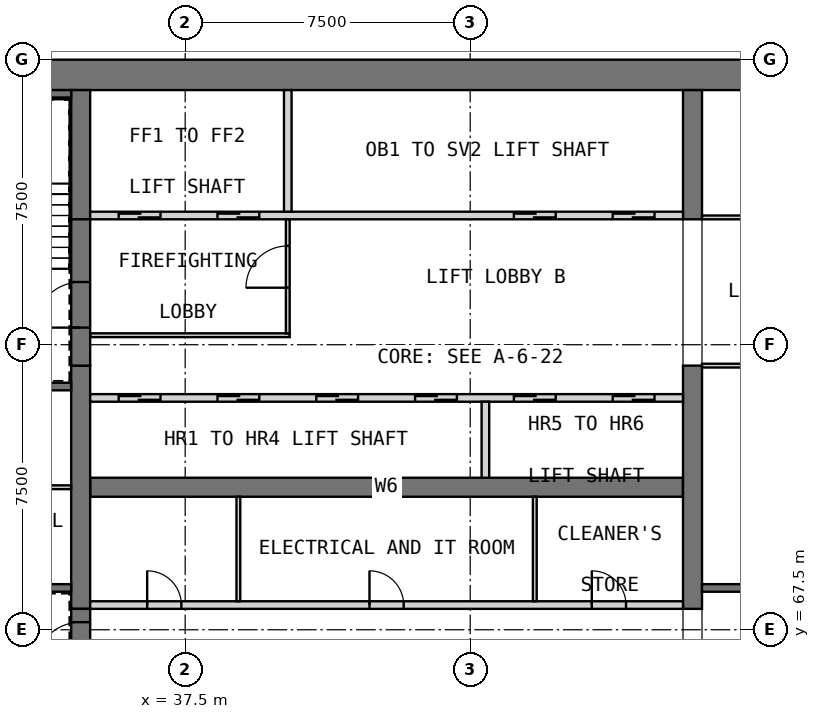
"""IFC4 building model, lengths in metres.
Left out: names, types, materials, properties, quantities, classifications, styles, units other than length and angle.
Written with IfcOpenShell. Run it as: python <this file> out.ifc"""

import sys

from ifc_helpers import new_model, si_unit, direction, frame, frame_2d, origin, place, context, subcontext, project, spatial, rectangle, extrude, element, fill, save


model = new_model("IFC4")
c1 = context("Model", 3, precision=1e-05, world=origin(), true_north=direction((0.0, 1.0)))
c2 = subcontext(c1, "Body", "Model", "MODEL_VIEW")
j1 = project(units=[si_unit("LENGTHUNIT", "METRE"), si_unit("PLANEANGLEUNIT", "RADIAN")], contexts=[c1])
p1 = place(None, origin())
s1 = spatial("IfcSite", under=j1, at=p1, CompositionType="ELEMENT")
p2 = place(p1, origin())
s2 = spatial("IfcBuilding", under=s1, at=p2, CompositionType="ELEMENT")
p3 = place(p2, frame((0.0, 0.0, 174.2)))
s3 = spatial("IfcBuildingStorey", under=s2, at=p3, CompositionType="ELEMENT", Elevation=174.2)
p4 = place(p3, frame((30.0, 82.1, 0.0), z_axis=(0.0, 0.0, 1.0), x_axis=(1.0, 0.0, 0.0)))
e1 = element("IfcWall", 1, at=p4, inside=s3, PredefinedType="SHEAR", context=c2, shape_type="SweptSolid", body=[
    extrude(rectangle(XDim=30.0, YDim=0.8, at=frame_2d((15.0, 0.0))), origin(), (0.0, 0.0, 1.0), 5.0),
])
p5 = place(p3, frame((35.0, 71.25, 0.0), z_axis=(0.0, 0.0, 1.0), x_axis=(1.0, 0.0, 0.0)))
e2 = element("IfcWall", 2, at=p5, inside=s3, PredefinedType="SHEAR", context=c2, shape_type="SweptSolid", body=[
    extrude(rectangle(XDim=15.6, YDim=0.5, at=frame_2d((7.8, 0.0))), origin(), (0.0, 0.0, 1.0), 5.0),
])
p6 = place(p3, frame((34.75, 68.05, 0.0), z_axis=(0.0, 0.0, 1.0), x_axis=(0.0, 1.0, 0.0)))
e3 = element("IfcWall", 3, at=p6, inside=s3, PredefinedType="SHEAR", context=c2, shape_type="SweptSolid", body=[
    extrude(rectangle(XDim=6.4, YDim=0.5, at=frame_2d((3.2, 0.0))), origin(), (0.0, 0.0, 1.0), 5.0),
])
p7 = place(p3, frame((34.75, 78.3, 0.0), z_axis=(0.0, 0.0, 1.0), x_axis=(0.0, 1.0, 0.0)))
e4 = element("IfcWall", 4, at=p7, inside=s3, PredefinedType="SHEAR", context=c2, shape_type="SweptSolid", body=[
    extrude(rectangle(XDim=3.4, YDim=0.5, at=frame_2d((1.7, 0.0))), origin(), (0.0, 0.0, 1.0), 5.0),
])
p8 = place(p3, frame((50.85, 68.05, 0.0), z_axis=(0.0, 0.0, 1.0), x_axis=(0.0, 1.0, 0.0)))
e5 = element("IfcWall", 5, at=p8, inside=s3, PredefinedType="SHEAR", context=c2, shape_type="SweptSolid", body=[
    extrude(rectangle(XDim=6.4, YDim=0.5, at=frame_2d((3.2, 0.0))), origin(), (0.0, 0.0, 1.0), 5.0),
])
p9 = place(p3, frame((50.85, 78.3, 0.0), z_axis=(0.0, 0.0, 1.0), x_axis=(0.0, 1.0, 0.0)))
e6 = element("IfcWall", 6, at=p9, inside=s3, PredefinedType="SHEAR", context=c2, shape_type="SweptSolid", body=[
    extrude(rectangle(XDim=3.4, YDim=0.5, at=frame_2d((1.7, 0.0))), origin(), (0.0, 0.0, 1.0), 5.0),
])
p10 = place(p3, frame((35.0, 68.15, 0.0), z_axis=(0.0, 0.0, 1.0), x_axis=(1.0, 0.0, 0.0)))
e7 = element("IfcWall", 7, at=p10, inside=s3, PredefinedType="PARTITIONING", context=c2, shape_type="SweptSolid", body=[
    extrude(rectangle(XDim=15.6, YDim=0.2, at=frame_2d((7.8, 0.0))), origin(), (0.0, 0.0, 1.0), 4.75),
])
p11 = place(p10, frame((1.5, 0.0, 0.0)))
e8 = element("IfcOpeningElement", 8, at=p11, cuts=e7, PredefinedType="OPENING", context=c2, shape_type="SweptSolid", body=[
    extrude(rectangle(XDim=0.9, YDim=2.1, at=frame_2d((0.45, 1.05))), frame((0.0, 0.11, 0.0), z_axis=(0.0, -1.0, 0.0), x_axis=(1.0, 0.0, 0.0)), (0.0, 0.0, 1.0), 0.22),
])
p12 = place(p10, frame((7.35, 0.0, 0.0)))
e9 = element("IfcOpeningElement", 9, at=p12, cuts=e7, PredefinedType="OPENING", context=c2, shape_type="SweptSolid", body=[
    extrude(rectangle(XDim=0.9, YDim=2.1, at=frame_2d((0.45, 1.05))), frame((0.0, 0.11, 0.0), z_axis=(0.0, -1.0, 0.0), x_axis=(1.0, 0.0, 0.0)), (0.0, 0.0, 1.0), 0.22),
])
p13 = place(p10, frame((13.2, 0.0, 0.0)))
e10 = element("IfcOpeningElement", 10, at=p13, cuts=e7, PredefinedType="OPENING", context=c2, shape_type="SweptSolid", body=[
    extrude(rectangle(XDim=0.9, YDim=2.1, at=frame_2d((0.45, 1.05))), frame((0.0, 0.11, 0.0), z_axis=(0.0, -1.0, 0.0), x_axis=(1.0, 0.0, 0.0)), (0.0, 0.0, 1.0), 0.22),
])
for number, where, z_axis, x_axis in (
    (11, (38.9, 68.25, 0.0), (0.0, 0.0, 1.0), (0.0, 1.0, 0.0)),
    (12, (46.7, 68.25, 0.0), (0.0, 0.0, 1.0), (0.0, 1.0, 0.0)),
):
    element("IfcWall", number, at=place(p3, frame(where, z_axis=z_axis, x_axis=x_axis)), inside=s3, PredefinedType="PARTITIONING", context=c2, shape_type="SweptSolid", body=[
        extrude(rectangle(XDim=2.75, YDim=0.1, at=frame_2d((1.375, 0.0))), origin(), (0.0, 0.0, 1.0), 4.75),
    ])
p14 = place(p3, frame((35.0, 73.6, 0.0), z_axis=(0.0, 0.0, 1.0), x_axis=(1.0, 0.0, 0.0)))
e13 = element("IfcWall", 13, at=p14, inside=s3, PredefinedType="SOLIDWALL", context=c2, shape_type="SweptSolid", body=[
    extrude(rectangle(XDim=15.6, YDim=0.2, at=frame_2d((7.8, 0.0))), origin(), (0.0, 0.0, 1.0), 5.0),
])
p15 = place(p14, frame((0.75, 0.0, 0.0)))
e14 = element("IfcOpeningElement", 14, at=p15, cuts=e13, PredefinedType="OPENING", context=c2, shape_type="SweptSolid", body=[
    extrude(rectangle(XDim=1.1, YDim=2.1, at=frame_2d((0.55, 1.05))), frame((0.0, 0.11, 0.0), z_axis=(0.0, -1.0, 0.0), x_axis=(1.0, 0.0, 0.0)), (0.0, 0.0, 1.0), 0.22),
])
p16 = place(p14, frame((3.35, 0.0, 0.0)))
e15 = element("IfcOpeningElement", 15, at=p16, cuts=e13, PredefinedType="OPENING", context=c2, shape_type="SweptSolid", body=[
    extrude(rectangle(XDim=1.1, YDim=2.1, at=frame_2d((0.55, 1.05))), frame((0.0, 0.11, 0.0), z_axis=(0.0, -1.0, 0.0), x_axis=(1.0, 0.0, 0.0)), (0.0, 0.0, 1.0), 0.22),
])
p17 = place(p14, frame((5.95, 0.0, 0.0)))
e16 = element("IfcOpeningElement", 16, at=p17, cuts=e13, PredefinedType="OPENING", context=c2, shape_type="SweptSolid", body=[
    extrude(rectangle(XDim=1.1, YDim=2.1, at=frame_2d((0.55, 1.05))), frame((0.0, 0.11, 0.0), z_axis=(0.0, -1.0, 0.0), x_axis=(1.0, 0.0, 0.0)), (0.0, 0.0, 1.0), 0.22),
])
p18 = place(p14, frame((8.55, 0.0, 0.0)))
e17 = element("IfcOpeningElement", 17, at=p18, cuts=e13, PredefinedType="OPENING", context=c2, shape_type="SweptSolid", body=[
    extrude(rectangle(XDim=1.1, YDim=2.1, at=frame_2d((0.55, 1.05))), frame((0.0, 0.11, 0.0), z_axis=(0.0, -1.0, 0.0), x_axis=(1.0, 0.0, 0.0)), (0.0, 0.0, 1.0), 0.22),
])
p19 = place(p14, frame((11.15, 0.0, 0.0)))
e18 = element("IfcOpeningElement", 18, at=p19, cuts=e13, PredefinedType="OPENING", context=c2, shape_type="SweptSolid", body=[
    extrude(rectangle(XDim=1.1, YDim=2.1, at=frame_2d((0.55, 1.05))), frame((0.0, 0.11, 0.0), z_axis=(0.0, -1.0, 0.0), x_axis=(1.0, 0.0, 0.0)), (0.0, 0.0, 1.0), 0.22),
])
p20 = place(p14, frame((13.75, 0.0, 0.0)))
e19 = element("IfcOpeningElement", 19, at=p20, cuts=e13, PredefinedType="OPENING", context=c2, shape_type="SweptSolid", body=[
    extrude(rectangle(XDim=1.1, YDim=2.1, at=frame_2d((0.55, 1.05))), frame((0.0, 0.11, 0.0), z_axis=(0.0, -1.0, 0.0), x_axis=(1.0, 0.0, 0.0)), (0.0, 0.0, 1.0), 0.22),
])
p21 = place(p3, frame((45.4, 71.5, 0.0), z_axis=(0.0, 0.0, 1.0), x_axis=(0.0, 1.0, 0.0)))
e20 = element("IfcWall", 20, at=p21, inside=s3, PredefinedType="SOLIDWALL", context=c2, shape_type="SweptSolid", body=[
    extrude(rectangle(XDim=2.0, YDim=0.2, at=frame_2d((1.0, 0.0))), origin(), (0.0, 0.0, 1.0), 5.0),
])
p22 = place(p3, frame((35.0, 78.4, 0.0), z_axis=(0.0, 0.0, 1.0), x_axis=(1.0, 0.0, 0.0)))
e21 = element("IfcWall", 21, at=p22, inside=s3, PredefinedType="SOLIDWALL", context=c2, shape_type="SweptSolid", body=[
    extrude(rectangle(XDim=15.6, YDim=0.2, at=frame_2d((7.8, 0.0))), origin(), (0.0, 0.0, 1.0), 5.0),
])
p23 = place(p22, frame((0.75, 0.0, 0.0)))
e22 = element("IfcOpeningElement", 22, at=p23, cuts=e21, PredefinedType="OPENING", context=c2, shape_type="SweptSolid", body=[
    extrude(rectangle(XDim=1.1, YDim=2.1, at=frame_2d((0.55, 1.05))), frame((0.0, 0.11, 0.0), z_axis=(0.0, -1.0, 0.0), x_axis=(1.0, 0.0, 0.0)), (0.0, 0.0, 1.0), 0.22),
])
p24 = place(p22, frame((3.35, 0.0, 0.0)))
e23 = element("IfcOpeningElement", 23, at=p24, cuts=e21, PredefinedType="OPENING", context=c2, shape_type="SweptSolid", body=[
    extrude(rectangle(XDim=1.1, YDim=2.1, at=frame_2d((0.55, 1.05))), frame((0.0, 0.11, 0.0), z_axis=(0.0, -1.0, 0.0), x_axis=(1.0, 0.0, 0.0)), (0.0, 0.0, 1.0), 0.22),
])
p25 = place(p22, frame((11.15, 0.0, 0.0)))
e24 = element("IfcOpeningElement", 24, at=p25, cuts=e21, PredefinedType="OPENING", context=c2, shape_type="SweptSolid", body=[
    extrude(rectangle(XDim=1.1, YDim=2.1, at=frame_2d((0.55, 1.05))), frame((0.0, 0.11, 0.0), z_axis=(0.0, -1.0, 0.0), x_axis=(1.0, 0.0, 0.0)), (0.0, 0.0, 1.0), 0.22),
])
p26 = place(p22, frame((13.75, 0.0, 0.0)))
e25 = element("IfcOpeningElement", 25, at=p26, cuts=e21, PredefinedType="OPENING", context=c2, shape_type="SweptSolid", body=[
    extrude(rectangle(XDim=1.1, YDim=2.1, at=frame_2d((0.55, 1.05))), frame((0.0, 0.11, 0.0), z_axis=(0.0, -1.0, 0.0), x_axis=(1.0, 0.0, 0.0)), (0.0, 0.0, 1.0), 0.22),
])
p27 = place(p3, frame((40.2, 78.5, 0.0), z_axis=(0.0, 0.0, 1.0), x_axis=(0.0, 1.0, 0.0)))
e26 = element("IfcWall", 26, at=p27, inside=s3, PredefinedType="SOLIDWALL", context=c2, shape_type="SweptSolid", body=[
    extrude(rectangle(XDim=3.2, YDim=0.2, at=frame_2d((1.6, 0.0))), origin(), (0.0, 0.0, 1.0), 5.0),
])
p28 = place(p3, frame((35.0, 75.25, 0.0), z_axis=(0.0, 0.0, 1.0), x_axis=(1.0, 0.0, 0.0)))
e27 = element("IfcWall", 27, at=p28, inside=s3, PredefinedType="PARTITIONING", context=c2, shape_type="SweptSolid", body=[
    extrude(rectangle(XDim=5.25, YDim=0.1, at=frame_2d((2.625, 0.0))), origin(), (0.0, 0.0, 1.0), 4.75),
])
p29 = place(p3, frame((40.2, 75.3, 0.0), z_axis=(0.0, 0.0, 1.0), x_axis=(0.0, 1.0, 0.0)))
e28 = element("IfcWall", 28, at=p29, inside=s3, PredefinedType="PARTITIONING", context=c2, shape_type="SweptSolid", body=[
    extrude(rectangle(XDim=3.0, YDim=0.1, at=frame_2d((1.5, 0.0))), origin(), (0.0, 0.0, 1.0), 4.75),
])
p30 = place(p29, frame((1.2, 0.0, 0.0)))
e29 = element("IfcOpeningElement", 29, at=p30, cuts=e28, PredefinedType="OPENING", context=c2, shape_type="SweptSolid", body=[
    extrude(rectangle(XDim=1.1, YDim=2.1, at=frame_2d((0.55, 1.05))), frame((0.0, 0.06, 0.0), z_axis=(0.0, -1.0, 0.0), x_axis=(1.0, 0.0, 0.0)), (0.0, 0.0, 1.0), 0.12),
])
p31 = place(p3, frame((34.75, 64.2, 0.0), z_axis=(0.0, 0.0, 1.0), x_axis=(0.0, 1.0, 0.0)))
e30 = element("IfcWall", 30, at=p31, inside=s3, PredefinedType="SOLIDWALL", context=c2, shape_type="SweptSolid", body=[
    extrude(rectangle(XDim=3.85, YDim=0.5, at=frame_2d((1.925, 0.0))), origin(), (0.0, 0.0, 1.0), 3.8),
])
p32 = place(p31, frame((2.3, 0.0, 0.0)))
e31 = element("IfcOpeningElement", 31, at=p32, cuts=e30, PredefinedType="OPENING", context=c2, shape_type="SweptSolid", body=[
    extrude(rectangle(XDim=1.2, YDim=2.1, at=frame_2d((0.6, 1.05))), frame((0.0, 0.26, 0.0), z_axis=(0.0, -1.0, 0.0), x_axis=(1.0, 0.0, 0.0)), (0.0, 0.0, 1.0), 0.52),
])
p33 = place(p3, frame((34.75, 74.45, 0.0), z_axis=(0.0, 0.0, 1.0), x_axis=(0.0, 1.0, 0.0)))
e32 = element("IfcWall", 32, at=p33, inside=s3, PredefinedType="SOLIDWALL", context=c2, shape_type="SweptSolid", body=[
    extrude(rectangle(XDim=3.85, YDim=0.5, at=frame_2d((1.925, 0.0))), origin(), (0.0, 0.0, 1.0), 3.8),
])
p34 = place(p33, frame((1.0, 0.0, 0.0)))
e33 = element("IfcOpeningElement", 33, at=p34, cuts=e32, PredefinedType="OPENING", context=c2, shape_type="SweptSolid", body=[
    extrude(rectangle(XDim=1.2, YDim=2.1, at=frame_2d((0.6, 1.05))), frame((0.0, 0.26, 0.0), z_axis=(0.0, -1.0, 0.0), x_axis=(1.0, 0.0, 0.0)), (0.0, 0.0, 1.0), 0.52),
])
p35 = place(p3, frame((30.8, 68.6, 0.0), z_axis=(0.0, 0.0, 1.0), x_axis=(1.0, 0.0, 0.0)))
e34 = element("IfcWall", 34, at=p35, inside=s3, PredefinedType="SOLIDWALL", context=c2, shape_type="SweptSolid", body=[
    extrude(rectangle(XDim=3.7, YDim=0.2, at=frame_2d((1.85, 0.0))), origin(), (0.0, 0.0, 1.0), 4.75),
])
p36 = place(p35, frame((1.5, 0.0, 0.0)))
e35 = element("IfcOpeningElement", 35, at=p36, cuts=e34, PredefinedType="OPENING", context=c2, shape_type="SweptSolid", body=[
    extrude(rectangle(XDim=0.9, YDim=2.1, at=frame_2d((0.45, 1.05))), frame((0.0, 0.11, 0.0), z_axis=(0.0, -1.0, 0.0), x_axis=(1.0, 0.0, 0.0)), (0.0, 0.0, 1.0), 0.22),
])
p37 = place(p3, frame((30.8, 73.9, 0.0), z_axis=(0.0, 0.0, 1.0), x_axis=(1.0, 0.0, 0.0)))
e36 = element("IfcWall", 36, at=p37, inside=s3, PredefinedType="SOLIDWALL", context=c2, shape_type="SweptSolid", body=[
    extrude(rectangle(XDim=3.7, YDim=0.2, at=frame_2d((1.85, 0.0))), origin(), (0.0, 0.0, 1.0), 4.75),
])
p38 = place(p37, frame((1.5, 0.0, 0.0)))
e37 = element("IfcOpeningElement", 37, at=p38, cuts=e36, PredefinedType="OPENING", context=c2, shape_type="SweptSolid", body=[
    extrude(rectangle(XDim=0.9, YDim=2.1, at=frame_2d((0.45, 1.05))), frame((0.0, 0.11, 0.0), z_axis=(0.0, -1.0, 0.0), x_axis=(1.0, 0.0, 0.0)), (0.0, 0.0, 1.0), 0.22),
])
p39 = place(p3, frame((51.1, 68.6, 0.0), z_axis=(0.0, 0.0, 1.0), x_axis=(1.0, 0.0, 0.0)))
e38 = element("IfcWall", 38, at=p39, inside=s3, PredefinedType="SOLIDWALL", context=c2, shape_type="SweptSolid", body=[
    extrude(rectangle(XDim=8.1, YDim=0.2, at=frame_2d((4.05, 0.0))), origin(), (0.0, 0.0, 1.0), 4.75),
])
p40 = place(p3, frame((31.0, 81.6, 0.0), z_axis=(0.0, 0.0, 1.0), x_axis=(1.0, 0.0, 0.0)))
e39 = element("IfcWall", 39, at=p40, inside=s3, PredefinedType="SOLIDWALL", context=c2, shape_type="SweptSolid", body=[
    extrude(rectangle(XDim=3.5, YDim=0.2, at=frame_2d((1.75, 0.0))), origin(), (0.0, 0.0, 1.0), 4.75),
])
p41 = place(p3, frame((30.8, 71.25, 0.0), z_axis=(0.0, 0.0, 1.0), x_axis=(1.0, 0.0, 0.0)))
e40 = element("IfcWall", 40, at=p41, inside=s3, PredefinedType="PARTITIONING", context=c2, shape_type="SweptSolid", body=[
    extrude(rectangle(XDim=3.7, YDim=0.1, at=frame_2d((1.85, 0.0))), origin(), (0.0, 0.0, 1.0), 4.75),
])
p42 = place(p3, frame((51.1, 74.45, 0.0), z_axis=(0.0, 0.0, 1.0), x_axis=(1.0, 0.0, 0.0)))
e41 = element("IfcWall", 41, at=p42, inside=s3, PredefinedType="PARTITIONING", context=c2, shape_type="SweptSolid", body=[
    extrude(rectangle(XDim=8.1, YDim=0.1, at=frame_2d((4.05, 0.0))), origin(), (0.0, 0.0, 1.0), 4.75),
])
p43 = place(p42, frame((3.6, 0.0, 0.0)))
e42 = element("IfcOpeningElement", 42, at=p43, cuts=e41, PredefinedType="OPENING", context=c2, shape_type="SweptSolid", body=[
    extrude(rectangle(XDim=0.9, YDim=2.1, at=frame_2d((0.45, 1.05))), frame((0.0, 0.06, 0.0), z_axis=(0.0, -1.0, 0.0), x_axis=(1.0, 0.0, 0.0)), (0.0, 0.0, 1.0), 0.12),
])
p44 = place(p3, frame((51.1, 78.35, 0.0), z_axis=(0.0, 0.0, 1.0), x_axis=(1.0, 0.0, 0.0)))
e43 = element("IfcWall", 43, at=p44, inside=s3, PredefinedType="PARTITIONING", context=c2, shape_type="SweptSolid", body=[
    extrude(rectangle(XDim=8.1, YDim=0.1, at=frame_2d((4.05, 0.0))), origin(), (0.0, 0.0, 1.0), 4.75),
])
p45 = place(p44, frame((3.6, 0.0, 0.0)))
e44 = element("IfcOpeningElement", 44, at=p45, cuts=e43, PredefinedType="OPENING", context=c2, shape_type="SweptSolid", body=[
    extrude(rectangle(XDim=0.9, YDim=2.1, at=frame_2d((0.45, 1.05))), frame((0.0, 0.06, 0.0), z_axis=(0.0, -1.0, 0.0), x_axis=(1.0, 0.0, 0.0)), (0.0, 0.0, 1.0), 0.12),
])
p46 = place(p11, origin())
e45 = element("IfcDoor", 45, at=p46, inside=s3, OperationType="SINGLE_SWING_RIGHT", PredefinedType="DOOR", context=c2, shape_type="SweptSolid", body=[
    extrude(rectangle(XDim=0.9, YDim=2.1, at=frame_2d((0.45, 1.05))), frame((0.0, 0.025, 0.0), z_axis=(0.0, -1.0, 0.0), x_axis=(1.0, 0.0, 0.0)), (0.0, 0.0, 1.0), 0.05),
])
fill(e8, e45)
p47 = place(p12, origin())
e46 = element("IfcDoor", 46, at=p47, inside=s3, OperationType="SINGLE_SWING_LEFT", PredefinedType="DOOR", context=c2, shape_type="SweptSolid", body=[
    extrude(rectangle(XDim=0.9, YDim=2.1, at=frame_2d((0.45, 1.05))), frame((0.0, 0.025, 0.0), z_axis=(0.0, -1.0, 0.0), x_axis=(1.0, 0.0, 0.0)), (0.0, 0.0, 1.0), 0.05),
])
fill(e9, e46)
p48 = place(p13, origin())
e47 = element("IfcDoor", 47, at=p48, inside=s3, OperationType="SINGLE_SWING_RIGHT", PredefinedType="DOOR", context=c2, shape_type="SweptSolid", body=[
    extrude(rectangle(XDim=0.9, YDim=2.1, at=frame_2d((0.45, 1.05))), frame((0.0, 0.025, 0.0), z_axis=(0.0, -1.0, 0.0), x_axis=(1.0, 0.0, 0.0)), (0.0, 0.0, 1.0), 0.05),
])
fill(e10, e47)
p49 = place(p15, origin())
e48 = element("IfcDoor", 48, at=p49, inside=s3, OperationType="DOUBLE_DOOR_SLIDING", PredefinedType="DOOR", context=c2, shape_type="SweptSolid", body=[
    extrude(rectangle(XDim=1.1, YDim=2.1, at=frame_2d((0.55, 1.05))), frame((0.0, 0.025, 0.0), z_axis=(0.0, -1.0, 0.0), x_axis=(1.0, 0.0, 0.0)), (0.0, 0.0, 1.0), 0.05),
])
fill(e14, e48)
p50 = place(p16, origin())
e49 = element("IfcDoor", 49, at=p50, inside=s3, OperationType="DOUBLE_DOOR_SLIDING", PredefinedType="DOOR", context=c2, shape_type="SweptSolid", body=[
    extrude(rectangle(XDim=1.1, YDim=2.1, at=frame_2d((0.55, 1.05))), frame((0.0, 0.025, 0.0), z_axis=(0.0, -1.0, 0.0), x_axis=(1.0, 0.0, 0.0)), (0.0, 0.0, 1.0), 0.05),
])
fill(e15, e49)
p51 = place(p17, origin())
e50 = element("IfcDoor", 50, at=p51, inside=s3, OperationType="DOUBLE_DOOR_SLIDING", PredefinedType="DOOR", context=c2, shape_type="SweptSolid", body=[
    extrude(rectangle(XDim=1.1, YDim=2.1, at=frame_2d((0.55, 1.05))), frame((0.0, 0.025, 0.0), z_axis=(0.0, -1.0, 0.0), x_axis=(1.0, 0.0, 0.0)), (0.0, 0.0, 1.0), 0.05),
])
fill(e16, e50)
p52 = place(p18, origin())
e51 = element("IfcDoor", 51, at=p52, inside=s3, OperationType="DOUBLE_DOOR_SLIDING", PredefinedType="DOOR", context=c2, shape_type="SweptSolid", body=[
    extrude(rectangle(XDim=1.1, YDim=2.1, at=frame_2d((0.55, 1.05))), frame((0.0, 0.025, 0.0), z_axis=(0.0, -1.0, 0.0), x_axis=(1.0, 0.0, 0.0)), (0.0, 0.0, 1.0), 0.05),
])
fill(e17, e51)
p53 = place(p19, origin())
e52 = element("IfcDoor", 52, at=p53, inside=s3, OperationType="DOUBLE_DOOR_SLIDING", PredefinedType="DOOR", context=c2, shape_type="SweptSolid", body=[
    extrude(rectangle(XDim=1.1, YDim=2.1, at=frame_2d((0.55, 1.05))), frame((0.0, 0.025, 0.0), z_axis=(0.0, -1.0, 0.0), x_axis=(1.0, 0.0, 0.0)), (0.0, 0.0, 1.0), 0.05),
])
fill(e18, e52)
p54 = place(p20, origin())
e53 = element("IfcDoor", 53, at=p54, inside=s3, OperationType="DOUBLE_DOOR_SLIDING", PredefinedType="DOOR", context=c2, shape_type="SweptSolid", body=[
    extrude(rectangle(XDim=1.1, YDim=2.1, at=frame_2d((0.55, 1.05))), frame((0.0, 0.025, 0.0), z_axis=(0.0, -1.0, 0.0), x_axis=(1.0, 0.0, 0.0)), (0.0, 0.0, 1.0), 0.05),
])
fill(e19, e53)
p55 = place(p23, origin())
e54 = element("IfcDoor", 54, at=p55, inside=s3, OperationType="DOUBLE_DOOR_SLIDING", PredefinedType="DOOR", context=c2, shape_type="SweptSolid", body=[
    extrude(rectangle(XDim=1.1, YDim=2.1, at=frame_2d((0.55, 1.05))), frame((0.0, 0.025, 0.0), z_axis=(0.0, -1.0, 0.0), x_axis=(1.0, 0.0, 0.0)), (0.0, 0.0, 1.0), 0.05),
])
fill(e22, e54)
p56 = place(p24, origin())
e55 = element("IfcDoor", 55, at=p56, inside=s3, OperationType="DOUBLE_DOOR_SLIDING", PredefinedType="DOOR", context=c2, shape_type="SweptSolid", body=[
    extrude(rectangle(XDim=1.1, YDim=2.1, at=frame_2d((0.55, 1.05))), frame((0.0, 0.025, 0.0), z_axis=(0.0, -1.0, 0.0), x_axis=(1.0, 0.0, 0.0)), (0.0, 0.0, 1.0), 0.05),
])
fill(e23, e55)
p57 = place(p25, origin())
e56 = element("IfcDoor", 56, at=p57, inside=s3, OperationType="DOUBLE_DOOR_SLIDING", PredefinedType="DOOR", context=c2, shape_type="SweptSolid", body=[
    extrude(rectangle(XDim=1.1, YDim=2.1, at=frame_2d((0.55, 1.05))), frame((0.0, 0.025, 0.0), z_axis=(0.0, -1.0, 0.0), x_axis=(1.0, 0.0, 0.0)), (0.0, 0.0, 1.0), 0.05),
])
fill(e24, e56)
p58 = place(p26, origin())
e57 = element("IfcDoor", 57, at=p58, inside=s3, OperationType="DOUBLE_DOOR_SLIDING", PredefinedType="DOOR", context=c2, shape_type="SweptSolid", body=[
    extrude(rectangle(XDim=1.1, YDim=2.1, at=frame_2d((0.55, 1.05))), frame((0.0, 0.025, 0.0), z_axis=(0.0, -1.0, 0.0), x_axis=(1.0, 0.0, 0.0)), (0.0, 0.0, 1.0), 0.05),
])
fill(e25, e57)
p59 = place(p30, origin())
e58 = element("IfcDoor", 58, at=p59, inside=s3, OperationType="SINGLE_SWING_LEFT", PredefinedType="DOOR", context=c2, shape_type="SweptSolid", body=[
    extrude(rectangle(XDim=1.1, YDim=2.1, at=frame_2d((0.55, 1.05))), frame((0.0, 0.025, 0.0), z_axis=(0.0, -1.0, 0.0), x_axis=(1.0, 0.0, 0.0)), (0.0, 0.0, 1.0), 0.05),
])
fill(e29, e58)
p60 = place(p32, origin())
e59 = element("IfcDoor", 59, at=p60, inside=s3, OperationType="SINGLE_SWING_LEFT", PredefinedType="DOOR", context=c2, shape_type="SweptSolid", body=[
    extrude(rectangle(XDim=1.2, YDim=2.1, at=frame_2d((0.6, 1.05))), frame((0.0, 0.025, 0.0), z_axis=(0.0, -1.0, 0.0), x_axis=(1.0, 0.0, 0.0)), (0.0, 0.0, 1.0), 0.05),
])
fill(e31, e59)
p61 = place(p34, origin())
e60 = element("IfcDoor", 60, at=p61, inside=s3, OperationType="SINGLE_SWING_RIGHT", PredefinedType="DOOR", context=c2, shape_type="SweptSolid", body=[
    extrude(rectangle(XDim=1.2, YDim=2.1, at=frame_2d((0.6, 1.05))), frame((0.0, 0.025, 0.0), z_axis=(0.0, -1.0, 0.0), x_axis=(1.0, 0.0, 0.0)), (0.0, 0.0, 1.0), 0.05),
])
fill(e33, e60)
save(model, sys.argv[1])
